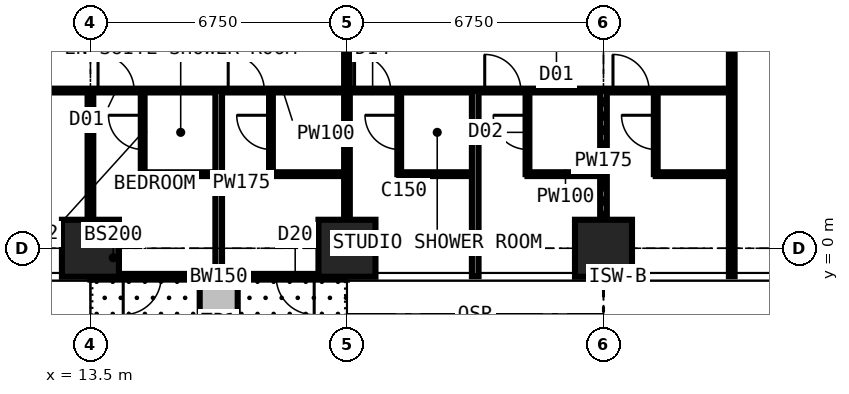
"""IFC4 building model, lengths in metres.
Left out: names, types, materials, properties, quantities, classifications, styles, units other than length and angle.
Written with IfcOpenShell. Run it as: python <this file> out.ifc"""

import sys

from ifc_helpers import new_model, si_unit, direction, frame, frame_2d, origin, origin_2d, place, context, subcontext, project, spatial, rectangle, extrude, element, fill, save


model = new_model("IFC4")
c1 = context("Model", 3, precision=1e-05, world=origin(), true_north=direction((0.0, 1.0)))
c2 = subcontext(c1, "Body", "Model", "MODEL_VIEW")
j1 = project(units=[si_unit("LENGTHUNIT", "METRE"), si_unit("PLANEANGLEUNIT", "RADIAN")], contexts=[c1])
p1 = place(None, origin())
s1 = spatial("IfcSite", under=j1, at=p1, CompositionType="ELEMENT")
p2 = place(p1, origin())
s2 = spatial("IfcBuilding", under=s1, at=p2, CompositionType="ELEMENT")
p3 = place(p2, frame((0.0, 0.0, 123.3)))
s3 = spatial("IfcBuildingStorey", under=s2, at=p3, CompositionType="ELEMENT", Elevation=123.3)
for number, where, z_axis, x_axis in (
    (1, (13.5, 0.0, 0.0), (0.0, 0.0, 1.0), (1.0, 0.0, 0.0)),
    (2, (20.25, 0.0, 0.0), (0.0, 0.0, 1.0), (1.0, 0.0, 0.0)),
    (3, (27.0, 0.0, 0.0), (0.0, 0.0, 1.0), (1.0, 0.0, 0.0)),
):
    element("IfcColumn", number, at=place(p3, frame(where, z_axis=z_axis, x_axis=x_axis)), inside=s3, PredefinedType="COLUMN", context=c2, shape_type="SweptSolid", body=[
        extrude(rectangle(XDim=1.5, YDim=1.5, at=origin_2d()), origin(), (0.0, 0.0, 1.0), 3.6),
    ])
p4 = place(p3, frame((20.25, -0.75, 0.0), z_axis=(0.0, 0.0, 1.0), x_axis=(-1.0, 0.0, 0.0)))
e4 = element("IfcWall", 4, at=p4, inside=s3, PredefinedType="SOLIDWALL", context=c2, shape_type="SweptSolid", body=[
    extrude(rectangle(XDim=6.75, YDim=0.15, at=frame_2d((3.375, 0.0))), origin(), (0.0, 0.0, 1.0), 3.375),
])
p5 = place(p4, frame((0.863, 0.0, 0.0)))
e5 = element("IfcOpeningElement", 5, at=p5, cuts=e4, PredefinedType="OPENING", context=c2, shape_type="SweptSolid", body=[
    extrude(rectangle(XDim=1.0, YDim=2.2, at=frame_2d((0.5, 1.1))), frame((0.0, 0.085, 0.0), z_axis=(0.0, -1.0, 0.0), x_axis=(1.0, 0.0, 0.0)), (0.0, 0.0, 1.0), 0.17),
])
p6 = place(p4, frame((1.975, 0.0, 0.9)))
e6 = element("IfcOpeningElement", 6, at=p6, cuts=e4, PredefinedType="OPENING", context=c2, shape_type="SweptSolid", body=[
    extrude(rectangle(XDim=1.2, YDim=1.8, at=frame_2d((0.6, 0.9))), frame((0.0, 0.085, 0.0), z_axis=(0.0, -1.0, 0.0), x_axis=(1.0, 0.0, 0.0)), (0.0, 0.0, 1.0), 0.17),
])
p7 = place(p4, frame((4.887, 0.0, 0.0)))
e7 = element("IfcOpeningElement", 7, at=p7, cuts=e4, PredefinedType="OPENING", context=c2, shape_type="SweptSolid", body=[
    extrude(rectangle(XDim=1.0, YDim=2.2, at=frame_2d((0.5, 1.1))), frame((0.0, 0.085, 0.0), z_axis=(0.0, -1.0, 0.0), x_axis=(1.0, 0.0, 0.0)), (0.0, 0.0, 1.0), 0.17),
])
p8 = place(p4, frame((3.575, 0.0, 0.9)))
e8 = element("IfcOpeningElement", 8, at=p8, cuts=e4, PredefinedType="OPENING", context=c2, shape_type="SweptSolid", body=[
    extrude(rectangle(XDim=1.2, YDim=1.8, at=frame_2d((0.6, 0.9))), frame((0.0, 0.085, 0.0), z_axis=(0.0, -1.0, 0.0), x_axis=(1.0, 0.0, 0.0)), (0.0, 0.0, 1.0), 0.17),
])
p9 = place(p3, frame((16.875, -0.85, 0.0), z_axis=(0.0, 0.0, 1.0), x_axis=(0.0, -1.0, 0.0)))
e9 = element("IfcWall", 9, at=p9, inside=s3, PredefinedType="USERDEFINED", context=c2, shape_type="SweptSolid", body=[
    extrude(rectangle(XDim=2.2, YDim=1.0, at=frame_2d((1.1, 0.0))), origin(), (0.0, 0.0, 1.0), 0.9),
])
p10 = place(p3, frame((6.75, 4.15, 0.0), z_axis=(0.0, 0.0, 1.0), x_axis=(1.0, 0.0, 0.0)))
e10 = element("IfcWall", 10, at=p10, inside=s3, PredefinedType="PARTITIONING", context=c2, shape_type="SweptSolid", body=[
    extrude(rectangle(XDim=23.625, YDim=0.1, at=frame_2d((11.812, 0.0))), origin(), (0.0, 0.0, 1.0), 3.375),
])
p11 = place(p10, frame((2.85, 0.0, 0.0)))
e11 = element("IfcOpeningElement", 11, at=p11, cuts=e10, PredefinedType="OPENING", context=c2, shape_type="SweptSolid", body=[
    extrude(rectangle(XDim=1.0, YDim=2.2, at=frame_2d((0.5, 1.1))), frame((0.0, 0.06, 0.0), z_axis=(0.0, -1.0, 0.0), x_axis=(1.0, 0.0, 0.0)), (0.0, 0.0, 1.0), 0.12),
])
p12 = place(p10, frame((6.95, 0.0, 0.0)))
e12 = element("IfcOpeningElement", 12, at=p12, cuts=e10, PredefinedType="OPENING", context=c2, shape_type="SweptSolid", body=[
    extrude(rectangle(XDim=0.95, YDim=2.2, at=frame_2d((0.475, 1.1))), frame((0.0, 0.06, 0.0), z_axis=(0.0, -1.0, 0.0), x_axis=(1.0, 0.0, 0.0)), (0.0, 0.0, 1.0), 0.12),
])
p13 = place(p10, frame((10.375, 0.0, 0.0)))
e13 = element("IfcOpeningElement", 13, at=p13, cuts=e10, PredefinedType="OPENING", context=c2, shape_type="SweptSolid", body=[
    extrude(rectangle(XDim=0.95, YDim=2.2, at=frame_2d((0.475, 1.1))), frame((0.0, 0.06, 0.0), z_axis=(0.0, -1.0, 0.0), x_axis=(1.0, 0.0, 0.0)), (0.0, 0.0, 1.0), 0.12),
])
p14 = place(p10, frame((13.7, 0.0, 0.0)))
e14 = element("IfcOpeningElement", 14, at=p14, cuts=e10, PredefinedType="OPENING", context=c2, shape_type="SweptSolid", body=[
    extrude(rectangle(XDim=0.95, YDim=2.2, at=frame_2d((0.475, 1.1))), frame((0.0, 0.06, 0.0), z_axis=(0.0, -1.0, 0.0), x_axis=(1.0, 0.0, 0.0)), (0.0, 0.0, 1.0), 0.12),
])
p15 = place(p10, frame((17.125, 0.0, 0.0)))
e15 = element("IfcOpeningElement", 15, at=p15, cuts=e10, PredefinedType="OPENING", context=c2, shape_type="SweptSolid", body=[
    extrude(rectangle(XDim=0.95, YDim=2.2, at=frame_2d((0.475, 1.1))), frame((0.0, 0.06, 0.0), z_axis=(0.0, -1.0, 0.0), x_axis=(1.0, 0.0, 0.0)), (0.0, 0.0, 1.0), 0.12),
])
p16 = place(p10, frame((20.5, 0.0, 0.0)))
e16 = element("IfcOpeningElement", 16, at=p16, cuts=e10, PredefinedType="OPENING", context=c2, shape_type="SweptSolid", body=[
    extrude(rectangle(XDim=0.95, YDim=2.2, at=frame_2d((0.475, 1.1))), frame((0.0, 0.06, 0.0), z_axis=(0.0, -1.0, 0.0), x_axis=(1.0, 0.0, 0.0)), (0.0, 0.0, 1.0), 0.12),
])
p17 = place(p3, frame((13.5, -0.734, 0.0), z_axis=(0.0, 0.0, 1.0), x_axis=(0.0, 1.0, 0.0)))
e17 = element("IfcWall", 17, at=p17, inside=s3, PredefinedType="PARTITIONING", context=c2, shape_type="SweptSolid", body=[
    extrude(rectangle(XDim=4.884, YDim=0.15, at=frame_2d((2.442, 0.0))), origin(), (0.0, 0.0, 1.0), 2.877),
])
p18 = place(p3, frame((14.875, 1.95, 0.0), z_axis=(0.0, 0.0, 1.0), x_axis=(0.0, 1.0, 0.0)))
e18 = element("IfcWall", 18, at=p18, inside=s3, PredefinedType="PARTITIONING", context=c2, shape_type="SweptSolid", body=[
    extrude(rectangle(XDim=2.2, YDim=0.1, at=frame_2d((1.1, 0.0))), origin(), (0.0, 0.0, 1.0), 3.375),
])
p19 = place(p18, frame((0.65, 0.0, 0.0)))
e19 = element("IfcOpeningElement", 19, at=p19, cuts=e18, PredefinedType="OPENING", context=c2, shape_type="SweptSolid", body=[
    extrude(rectangle(XDim=0.9, YDim=2.2, at=frame_2d((0.45, 1.1))), frame((0.0, 0.06, 0.0), z_axis=(0.0, -1.0, 0.0), x_axis=(1.0, 0.0, 0.0)), (0.0, 0.0, 1.0), 0.12),
])
p20 = place(p3, frame((14.875, 1.95, 0.0), z_axis=(0.0, 0.0, 1.0), x_axis=(1.0, 0.0, 0.0)))
e20 = element("IfcWall", 20, at=p20, inside=s3, PredefinedType="PARTITIONING", context=c2, shape_type="SweptSolid", body=[
    extrude(rectangle(XDim=2.0, YDim=0.1, at=frame_2d((1.0, 0.0))), origin(), (0.0, 0.0, 1.0), 3.375),
])
p21 = place(p3, frame((16.875, -0.734, 0.0), z_axis=(0.0, 0.0, 1.0), x_axis=(0.0, 1.0, 0.0)))
e21 = element("IfcWall", 21, at=p21, inside=s3, PredefinedType="PARTITIONING", context=c2, shape_type="SweptSolid", body=[
    extrude(rectangle(XDim=4.884, YDim=0.175, at=frame_2d((2.442, 0.0))), origin(), (0.0, 0.0, 1.0), 3.375),
])
p22 = place(p3, frame((18.25, 1.95, 0.0), z_axis=(0.0, 0.0, 1.0), x_axis=(0.0, 1.0, 0.0)))
e22 = element("IfcWall", 22, at=p22, inside=s3, PredefinedType="PARTITIONING", context=c2, shape_type="SweptSolid", body=[
    extrude(rectangle(XDim=2.2, YDim=0.1, at=frame_2d((1.1, 0.0))), origin(), (0.0, 0.0, 1.0), 3.375),
])
p23 = place(p22, frame((0.65, 0.0, 0.0)))
e23 = element("IfcOpeningElement", 23, at=p23, cuts=e22, PredefinedType="OPENING", context=c2, shape_type="SweptSolid", body=[
    extrude(rectangle(XDim=0.9, YDim=2.2, at=frame_2d((0.45, 1.1))), frame((0.0, 0.06, 0.0), z_axis=(0.0, -1.0, 0.0), x_axis=(1.0, 0.0, 0.0)), (0.0, 0.0, 1.0), 0.12),
])
p24 = place(p3, frame((18.25, 1.95, 0.0), z_axis=(0.0, 0.0, 1.0), x_axis=(1.0, 0.0, 0.0)))
e24 = element("IfcWall", 24, at=p24, inside=s3, PredefinedType="PARTITIONING", context=c2, shape_type="SweptSolid", body=[
    extrude(rectangle(XDim=2.0, YDim=0.1, at=frame_2d((1.0, 0.0))), origin(), (0.0, 0.0, 1.0), 3.375),
])
p25 = place(p3, frame((20.25, -0.734, 0.0), z_axis=(0.0, 0.0, 1.0), x_axis=(0.0, 1.0, 0.0)))
e25 = element("IfcWall", 25, at=p25, inside=s3, PredefinedType="PARTITIONING", context=c2, shape_type="SweptSolid", body=[
    extrude(rectangle(XDim=12.034, YDim=0.15, at=frame_2d((6.017, 0.0))), origin(), (0.0, 0.0, 1.0), 2.61),
])
p26 = place(p3, frame((21.625, 1.95, 0.0), z_axis=(0.0, 0.0, 1.0), x_axis=(0.0, 1.0, 0.0)))
e26 = element("IfcWall", 26, at=p26, inside=s3, PredefinedType="PARTITIONING", context=c2, shape_type="SweptSolid", body=[
    extrude(rectangle(XDim=2.2, YDim=0.1, at=frame_2d((1.1, 0.0))), origin(), (0.0, 0.0, 1.0), 3.375),
])
p27 = place(p26, frame((0.65, 0.0, 0.0)))
e27 = element("IfcOpeningElement", 27, at=p27, cuts=e26, PredefinedType="OPENING", context=c2, shape_type="SweptSolid", body=[
    extrude(rectangle(XDim=0.9, YDim=2.2, at=frame_2d((0.45, 1.1))), frame((0.0, 0.06, 0.0), z_axis=(0.0, -1.0, 0.0), x_axis=(1.0, 0.0, 0.0)), (0.0, 0.0, 1.0), 0.12),
])
p28 = place(p3, frame((21.625, 1.95, 0.0), z_axis=(0.0, 0.0, 1.0), x_axis=(1.0, 0.0, 0.0)))
e28 = element("IfcWall", 28, at=p28, inside=s3, PredefinedType="PARTITIONING", context=c2, shape_type="SweptSolid", body=[
    extrude(rectangle(XDim=2.0, YDim=0.1, at=frame_2d((1.0, 0.0))), origin(), (0.0, 0.0, 1.0), 3.375),
])
p29 = place(p3, frame((23.625, -0.734, 0.0), z_axis=(0.0, 0.0, 1.0), x_axis=(0.0, 1.0, 0.0)))
e29 = element("IfcWall", 29, at=p29, inside=s3, PredefinedType="PARTITIONING", context=c2, shape_type="SweptSolid", body=[
    extrude(rectangle(XDim=4.884, YDim=0.175, at=frame_2d((2.442, 0.0))), origin(), (0.0, 0.0, 1.0), 3.375),
])
p30 = place(p3, frame((25.0, 1.95, 0.0), z_axis=(0.0, 0.0, 1.0), x_axis=(0.0, 1.0, 0.0)))
e30 = element("IfcWall", 30, at=p30, inside=s3, PredefinedType="PARTITIONING", context=c2, shape_type="SweptSolid", body=[
    extrude(rectangle(XDim=2.2, YDim=0.1, at=frame_2d((1.1, 0.0))), origin(), (0.0, 0.0, 1.0), 3.375),
])
p31 = place(p30, frame((0.65, 0.0, 0.0)))
e31 = element("IfcOpeningElement", 31, at=p31, cuts=e30, PredefinedType="OPENING", context=c2, shape_type="SweptSolid", body=[
    extrude(rectangle(XDim=0.9, YDim=2.2, at=frame_2d((0.45, 1.1))), frame((0.0, 0.06, 0.0), z_axis=(0.0, -1.0, 0.0), x_axis=(1.0, 0.0, 0.0)), (0.0, 0.0, 1.0), 0.12),
])
p32 = place(p3, frame((25.0, 1.95, 0.0), z_axis=(0.0, 0.0, 1.0), x_axis=(1.0, 0.0, 0.0)))
e32 = element("IfcWall", 32, at=p32, inside=s3, PredefinedType="PARTITIONING", context=c2, shape_type="SweptSolid", body=[
    extrude(rectangle(XDim=2.0, YDim=0.1, at=frame_2d((1.0, 0.0))), origin(), (0.0, 0.0, 1.0), 3.375),
])
p33 = place(p3, frame((27.0, -0.734, 0.0), z_axis=(0.0, 0.0, 1.0), x_axis=(0.0, 1.0, 0.0)))
e33 = element("IfcWall", 33, at=p33, inside=s3, PredefinedType="PARTITIONING", context=c2, shape_type="SweptSolid", body=[
    extrude(rectangle(XDim=4.884, YDim=0.175, at=frame_2d((2.442, 0.0))), origin(), (0.0, 0.0, 1.0), 2.61),
])
p34 = place(p3, frame((28.375, 1.95, 0.0), z_axis=(0.0, 0.0, 1.0), x_axis=(0.0, 1.0, 0.0)))
e34 = element("IfcWall", 34, at=p34, inside=s3, PredefinedType="PARTITIONING", context=c2, shape_type="SweptSolid", body=[
    extrude(rectangle(XDim=2.2, YDim=0.1, at=frame_2d((1.1, 0.0))), origin(), (0.0, 0.0, 1.0), 3.375),
])
p35 = place(p34, frame((0.65, 0.0, 0.0)))
e35 = element("IfcOpeningElement", 35, at=p35, cuts=e34, PredefinedType="OPENING", context=c2, shape_type="SweptSolid", body=[
    extrude(rectangle(XDim=0.9, YDim=2.2, at=frame_2d((0.45, 1.1))), frame((0.0, 0.06, 0.0), z_axis=(0.0, -1.0, 0.0), x_axis=(1.0, 0.0, 0.0)), (0.0, 0.0, 1.0), 0.12),
])
p36 = place(p3, frame((28.375, 1.95, 0.0), z_axis=(0.0, 0.0, 1.0), x_axis=(1.0, 0.0, 0.0)))
e36 = element("IfcWall", 36, at=p36, inside=s3, PredefinedType="PARTITIONING", context=c2, shape_type="SweptSolid", body=[
    extrude(rectangle(XDim=2.0, YDim=0.1, at=frame_2d((1.0, 0.0))), origin(), (0.0, 0.0, 1.0), 3.375),
])
p37 = place(p3, frame((30.375, -0.734, 0.0), z_axis=(0.0, 0.0, 1.0), x_axis=(0.0, 1.0, 0.0)))
e37 = element("IfcWall", 37, at=p37, inside=s3, PredefinedType="PARTITIONING", context=c2, shape_type="SweptSolid", body=[
    extrude(rectangle(XDim=12.034, YDim=0.15, at=frame_2d((6.017, 0.0))), origin(), (0.0, 0.0, 1.0), 3.375),
])
p38 = place(p5, origin())
e38 = element("IfcDoor", 38, at=p38, inside=s3, OperationType="SINGLE_SWING_LEFT", PredefinedType="DOOR", context=c2, shape_type="SweptSolid", body=[
    extrude(rectangle(XDim=1.0, YDim=2.2, at=frame_2d((0.5, 1.1))), frame((0.0, 0.025, 0.0), z_axis=(0.0, -1.0, 0.0), x_axis=(1.0, 0.0, 0.0)), (0.0, 0.0, 1.0), 0.05),
])
fill(e5, e38)
p39 = place(p6, origin())
e39 = element("IfcWindow", 39, at=p39, inside=s3, PartitioningType="SINGLE_PANEL", PredefinedType="WINDOW", context=c2, shape_type="SweptSolid", body=[
    extrude(rectangle(XDim=1.2, YDim=1.8, at=frame_2d((0.6, 0.9))), frame((0.0, 0.03, 0.0), z_axis=(0.0, -1.0, 0.0), x_axis=(1.0, 0.0, 0.0)), (0.0, 0.0, 1.0), 0.06),
])
fill(e6, e39)
p40 = place(p7, origin())
e40 = element("IfcDoor", 40, at=p40, inside=s3, OperationType="SINGLE_SWING_RIGHT", PredefinedType="DOOR", context=c2, shape_type="SweptSolid", body=[
    extrude(rectangle(XDim=1.0, YDim=2.2, at=frame_2d((0.5, 1.1))), frame((0.0, 0.025, 0.0), z_axis=(0.0, -1.0, 0.0), x_axis=(1.0, 0.0, 0.0)), (0.0, 0.0, 1.0), 0.05),
])
fill(e7, e40)
p41 = place(p8, origin())
e41 = element("IfcWindow", 41, at=p41, inside=s3, PartitioningType="SINGLE_PANEL", PredefinedType="WINDOW", context=c2, shape_type="SweptSolid", body=[
    extrude(rectangle(XDim=1.2, YDim=1.8, at=frame_2d((0.6, 0.9))), frame((0.0, 0.03, 0.0), z_axis=(0.0, -1.0, 0.0), x_axis=(1.0, 0.0, 0.0)), (0.0, 0.0, 1.0), 0.06),
])
fill(e8, e41)
p42 = place(p12, origin())
e42 = element("IfcDoor", 42, at=p42, inside=s3, OperationType="SINGLE_SWING_LEFT", PredefinedType="DOOR", context=c2, shape_type="SweptSolid", body=[
    extrude(rectangle(XDim=0.95, YDim=2.2, at=frame_2d((0.475, 1.1))), frame((0.0, 0.025, 0.0), z_axis=(0.0, -1.0, 0.0), x_axis=(1.0, 0.0, 0.0)), (0.0, 0.0, 1.0), 0.05),
])
fill(e12, e42)
p43 = place(p19, origin())
e43 = element("IfcDoor", 43, at=p43, inside=s3, OperationType="SINGLE_SWING_RIGHT", PredefinedType="DOOR", context=c2, shape_type="SweptSolid", body=[
    extrude(rectangle(XDim=0.9, YDim=2.2, at=frame_2d((0.45, 1.1))), frame((0.0, 0.025, 0.0), z_axis=(0.0, -1.0, 0.0), x_axis=(1.0, 0.0, 0.0)), (0.0, 0.0, 1.0), 0.05),
])
fill(e19, e43)
p44 = place(p13, origin())
e44 = element("IfcDoor", 44, at=p44, inside=s3, OperationType="SINGLE_SWING_LEFT", PredefinedType="DOOR", context=c2, shape_type="SweptSolid", body=[
    extrude(rectangle(XDim=0.95, YDim=2.2, at=frame_2d((0.475, 1.1))), frame((0.0, 0.025, 0.0), z_axis=(0.0, -1.0, 0.0), x_axis=(1.0, 0.0, 0.0)), (0.0, 0.0, 1.0), 0.05),
])
fill(e13, e44)
p45 = place(p23, origin())
e45 = element("IfcDoor", 45, at=p45, inside=s3, OperationType="SINGLE_SWING_RIGHT", PredefinedType="DOOR", context=c2, shape_type="SweptSolid", body=[
    extrude(rectangle(XDim=0.9, YDim=2.2, at=frame_2d((0.45, 1.1))), frame((0.0, 0.025, 0.0), z_axis=(0.0, -1.0, 0.0), x_axis=(1.0, 0.0, 0.0)), (0.0, 0.0, 1.0), 0.05),
])
fill(e23, e45)
p46 = place(p14, origin())
e46 = element("IfcDoor", 46, at=p46, inside=s3, OperationType="SINGLE_SWING_LEFT", PredefinedType="DOOR", context=c2, shape_type="SweptSolid", body=[
    extrude(rectangle(XDim=0.95, YDim=2.2, at=frame_2d((0.475, 1.1))), frame((0.0, 0.025, 0.0), z_axis=(0.0, -1.0, 0.0), x_axis=(1.0, 0.0, 0.0)), (0.0, 0.0, 1.0), 0.05),
])
fill(e14, e46)
p47 = place(p27, origin())
e47 = element("IfcDoor", 47, at=p47, inside=s3, OperationType="SINGLE_SWING_RIGHT", PredefinedType="DOOR", context=c2, shape_type="SweptSolid", body=[
    extrude(rectangle(XDim=0.9, YDim=2.2, at=frame_2d((0.45, 1.1))), frame((0.0, 0.025, 0.0), z_axis=(0.0, -1.0, 0.0), x_axis=(1.0, 0.0, 0.0)), (0.0, 0.0, 1.0), 0.05),
])
fill(e27, e47)
p48 = place(p15, origin())
e48 = element("IfcDoor", 48, at=p48, inside=s3, OperationType="SINGLE_SWING_LEFT", PredefinedType="DOOR", context=c2, shape_type="SweptSolid", body=[
    extrude(rectangle(XDim=0.95, YDim=2.2, at=frame_2d((0.475, 1.1))), frame((0.0, 0.025, 0.0), z_axis=(0.0, -1.0, 0.0), x_axis=(1.0, 0.0, 0.0)), (0.0, 0.0, 1.0), 0.05),
])
fill(e15, e48)
p49 = place(p31, origin())
e49 = element("IfcDoor", 49, at=p49, inside=s3, OperationType="SINGLE_SWING_RIGHT", PredefinedType="DOOR", context=c2, shape_type="SweptSolid", body=[
    extrude(rectangle(XDim=0.9, YDim=2.2, at=frame_2d((0.45, 1.1))), frame((0.0, 0.025, 0.0), z_axis=(0.0, -1.0, 0.0), x_axis=(1.0, 0.0, 0.0)), (0.0, 0.0, 1.0), 0.05),
])
fill(e31, e49)
p50 = place(p16, origin())
e50 = element("IfcDoor", 50, at=p50, inside=s3, OperationType="SINGLE_SWING_LEFT", PredefinedType="DOOR", context=c2, shape_type="SweptSolid", body=[
    extrude(rectangle(XDim=0.95, YDim=2.2, at=frame_2d((0.475, 1.1))), frame((0.0, 0.025, 0.0), z_axis=(0.0, -1.0, 0.0), x_axis=(1.0, 0.0, 0.0)), (0.0, 0.0, 1.0), 0.05),
])
fill(e16, e50)
p51 = place(p35, origin())
e51 = element("IfcDoor", 51, at=p51, inside=s3, OperationType="SINGLE_SWING_RIGHT", PredefinedType="DOOR", context=c2, shape_type="SweptSolid", body=[
    extrude(rectangle(XDim=0.9, YDim=2.2, at=frame_2d((0.45, 1.1))), frame((0.0, 0.025, 0.0), z_axis=(0.0, -1.0, 0.0), x_axis=(1.0, 0.0, 0.0)), (0.0, 0.0, 1.0), 0.05),
])
fill(e35, e51)
save(model, sys.argv[1])
